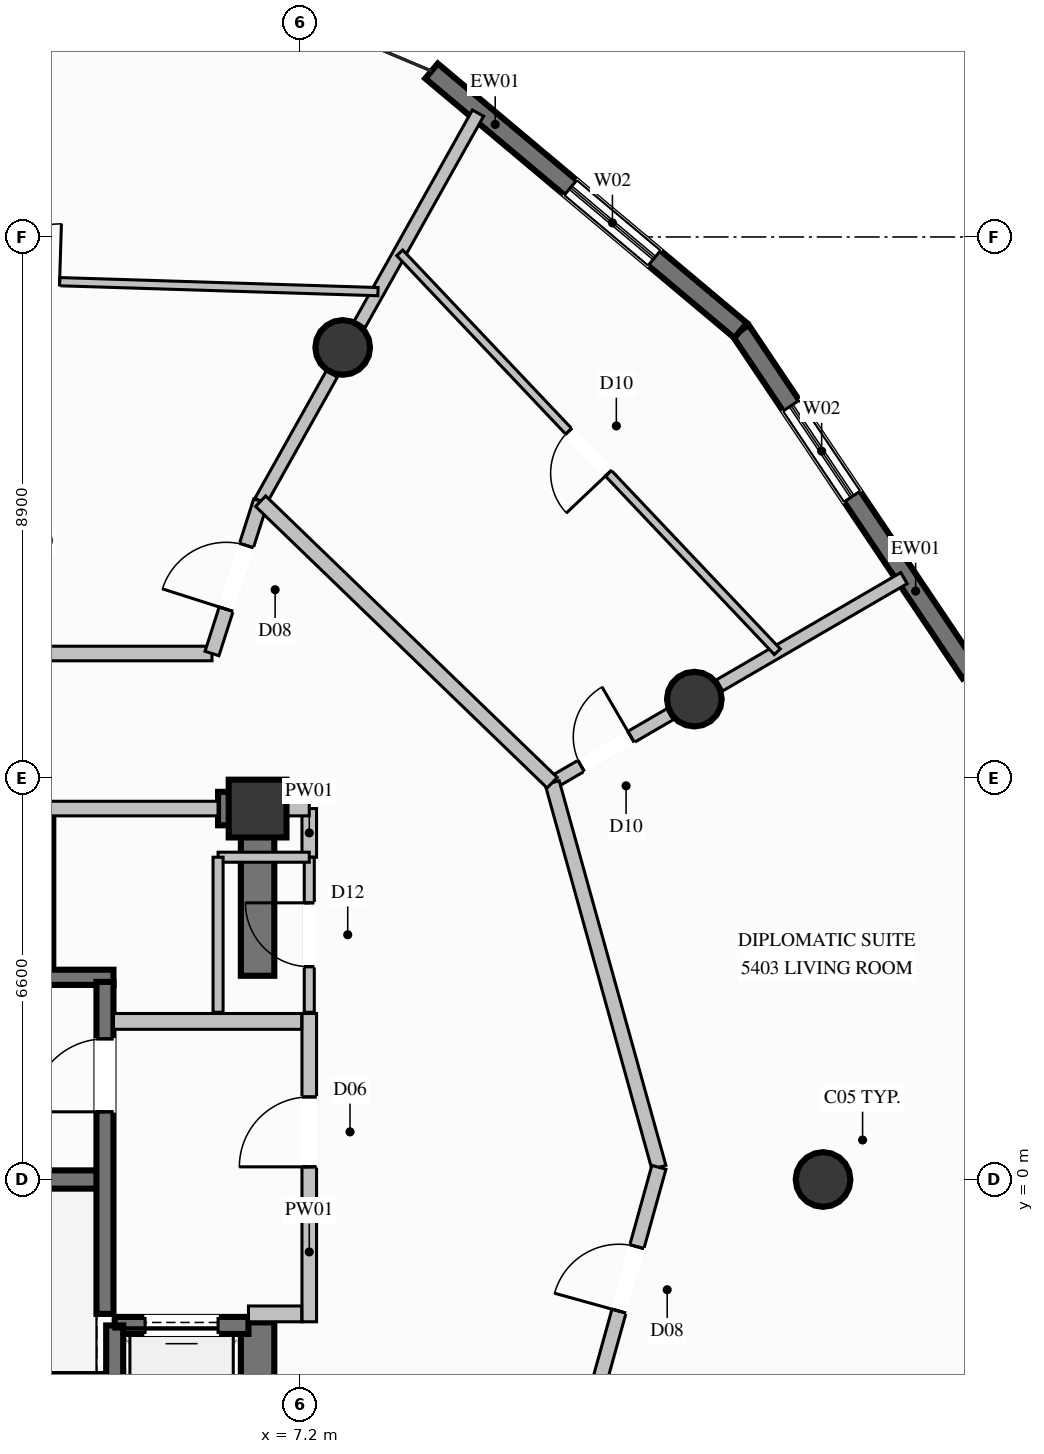
"""IFC4 building model, lengths in metres.
Left out: names, types, materials, properties, quantities, classifications, styles, units other than length and angle.
Written with IfcOpenShell. Run it as: python <this file> out.ifc"""

import sys

from ifc_helpers import new_model, si_unit, direction, frame, frame_2d, origin, origin_2d, place, context, subcontext, project, spatial, rectangle, circle, extrude, element, fill, save


model = new_model("IFC4")
c1 = context("Model", 3, precision=1e-05, world=origin(), true_north=direction((0.0, 1.0)))
c2 = subcontext(c1, "Body", "Model", "MODEL_VIEW")
j1 = project(units=[si_unit("LENGTHUNIT", "METRE"), si_unit("PLANEANGLEUNIT", "RADIAN")], contexts=[c1])
p1 = place(None, origin())
s1 = spatial("IfcSite", under=j1, at=p1, CompositionType="ELEMENT")
p2 = place(p1, origin())
s2 = spatial("IfcBuilding", under=s1, at=p2, CompositionType="ELEMENT")
p3 = place(p2, frame((0.0, 0.0, 202.0)))
s3 = spatial("IfcBuildingStorey", under=s2, at=p3, CompositionType="ELEMENT", Elevation=202.0)
p4 = place(p3, frame((6.5, 6.1, 0.0), z_axis=(0.0, 0.0, 1.0), x_axis=(1.0, 0.0, 0.0)))
e1 = element("IfcColumn", 1, at=p4, inside=s3, PredefinedType="COLUMN", context=c2, shape_type="SweptSolid", body=[
    extrude(rectangle(XDim=0.95, YDim=0.95, at=origin_2d()), origin(), (0.0, 0.0, 1.0), 3.6),
])
p5 = place(p3, frame((-3.99, 0.0, 0.0), z_axis=(0.0, 0.0, 1.0), x_axis=(1.0, 0.0, 0.0)))
e2 = element("IfcWall", 2, at=p5, inside=s3, PredefinedType="SHEAR", context=c2, shape_type="SweptSolid", body=[
    extrude(rectangle(XDim=7.98, YDim=0.3, at=frame_2d((3.99, 0.0))), origin(), (0.0, 0.0, 1.0), 3.6),
])
for number, where, z_axis, x_axis in (
    (3, (-4.13, -3.325, 0.0), (0.0, 0.0, 1.0), (1.0, 0.0, 0.0)),
    (4, (-4.13, 3.325, 0.0), (0.0, 0.0, 1.0), (1.0, 0.0, 0.0)),
):
    element("IfcWall", number, at=place(p3, frame(where, z_axis=z_axis, x_axis=x_axis)), inside=s3, PredefinedType="SOLIDWALL", context=c2, shape_type="SweptSolid", body=[
        extrude(rectangle(XDim=8.26, YDim=0.25, at=frame_2d((4.13, 0.0))), origin(), (0.0, 0.0, 1.0), 3.6),
    ])
p6 = place(p3, frame((5.85, 6.1, 0.0), z_axis=(0.0, 0.0, 1.0), x_axis=(1.0, 0.0, 0.0)))
e5 = element("IfcWall", 5, at=p6, inside=s3, PredefinedType="SHEAR", context=c2, shape_type="SweptSolid", body=[
    extrude(rectangle(XDim=0.375, YDim=0.55, at=frame_2d((0.188, 0.0))), origin(), (0.0, 0.0, 1.0), 3.6),
])
p7 = place(p3, frame((6.5, -6.375, 0.0), z_axis=(0.0, 0.0, 1.0), x_axis=(0.0, 1.0, 0.0)))
e6 = element("IfcWall", 6, at=p7, inside=s3, PredefinedType="SHEAR", context=c2, shape_type="SweptSolid", body=[
    extrude(rectangle(XDim=4.025, YDim=0.55, at=frame_2d((2.012, 0.0))), origin(), (0.0, 0.0, 1.0), 3.6),
])
p8 = place(p3, frame((6.5, 3.35, 0.0), z_axis=(0.0, 0.0, 1.0), x_axis=(0.0, 1.0, 0.0)))
e7 = element("IfcWall", 7, at=p8, inside=s3, PredefinedType="SHEAR", context=c2, shape_type="SweptSolid", body=[
    extrude(rectangle(XDim=3.025, YDim=0.55, at=frame_2d((1.512, 0.0))), origin(), (0.0, 0.0, 1.0), 3.6),
])
for number, where, z_axis, x_axis in (
    (8, (15.8, 0.0, 0.0), (0.0, 0.0, 1.0), (1.0, 0.0, 0.0)),
    (9, (13.683, 7.9, 0.0), (0.0, 0.0, 1.0), (1.0, 0.0, 0.0)),
    (10, (7.9, 13.683, 0.0), (0.0, 0.0, 1.0), (1.0, 0.0, 0.0)),
):
    element("IfcColumn", number, at=place(p3, frame(where, z_axis=z_axis, x_axis=x_axis)), inside=s3, PredefinedType="COLUMN", context=c2, shape_type="SweptSolid", body=[
        extrude(circle(Radius=0.45, at=origin_2d()), origin(), (0.0, 0.0, 1.0), 3.6),
    ])
p9 = place(p3, frame((14.445, 13.962, 0.0), z_axis=(0.0, 0.0, 1.0), x_axis=(0.557429227347, -0.830224461516, 0.0)))
e11 = element("IfcWall", 11, at=p9, inside=s3, PredefinedType="SOLIDWALL", context=c2, shape_type="SweptSolid", body=[
    extrude(rectangle(XDim=6.785, YDim=0.32, at=frame_2d((3.392, 0.0))), origin(), (0.0, 0.0, 1.0), 3.36),
])
p10 = place(p9, frame((1.489, 0.0, 0.35)))
e12 = element("IfcOpeningElement", 12, at=p10, cuts=e11, PredefinedType="OPENING", context=c2, shape_type="SweptSolid", body=[
    extrude(rectangle(XDim=1.8, YDim=2.6, at=frame_2d((0.9, 1.3))), frame((0.0, 0.17, 0.0), z_axis=(0.0, -1.0, 0.0), x_axis=(1.0, 0.0, 0.0)), (0.0, 0.0, 1.0), 0.34),
])
p11 = place(p3, frame((9.361, 18.229, 0.0), z_axis=(0.0, 0.0, 1.0), x_axis=(0.765961316102, -0.642886663601, 0.0)))
e13 = element("IfcWall", 13, at=p11, inside=s3, PredefinedType="SOLIDWALL", context=c2, shape_type="SweptSolid", body=[
    extrude(rectangle(XDim=6.637, YDim=0.32, at=frame_2d((3.319, 0.0))), origin(), (0.0, 0.0, 1.0), 3.36),
])
p12 = place(p11, frame((2.984, 0.0, 0.35)))
e14 = element("IfcOpeningElement", 14, at=p12, cuts=e13, PredefinedType="OPENING", context=c2, shape_type="SweptSolid", body=[
    extrude(rectangle(XDim=1.8, YDim=2.6, at=frame_2d((0.9, 1.3))), frame((0.0, 0.17, 0.0), z_axis=(0.0, -1.0, 0.0), x_axis=(1.0, 0.0, 0.0)), (0.0, 0.0, 1.0), 0.34),
])
p13 = place(p3, frame((3.0, 3.5, 0.0), z_axis=(0.0, 0.0, 1.0), x_axis=(0.0, 1.0, 0.0)))
e15 = element("IfcWall", 15, at=p13, inside=s3, PredefinedType="SOLIDWALL", context=c2, shape_type="SweptSolid", body=[
    extrude(rectangle(XDim=2.5, YDim=0.28, at=frame_2d((1.25, 0.0))), origin(), (0.0, 0.0, 1.0), 3.36),
])
p14 = place(p3, frame((6.35, -2.4, 0.0), z_axis=(0.0, 0.0, 1.0), x_axis=(-1.0, 0.0, 0.0)))
e16 = element("IfcWall", 16, at=p14, inside=s3, PredefinedType="SOLIDWALL", context=c2, shape_type="SweptSolid", body=[
    extrude(rectangle(XDim=2.2, YDim=0.28, at=frame_2d((1.1, 0.0))), origin(), (0.0, 0.0, 1.0), 3.36),
])
p15 = place(p14, frame((0.5, 0.0, 0.0)))
e17 = element("IfcOpeningElement", 17, at=p15, cuts=e16, PredefinedType="OPENING", context=c2, shape_type="SweptSolid", body=[
    extrude(rectangle(XDim=1.2, YDim=2.2, at=frame_2d((0.6, 1.1))), frame((0.0, 0.15, 0.0), z_axis=(0.0, -1.0, 0.0), x_axis=(1.0, 0.0, 0.0)), (0.0, 0.0, 1.0), 0.3),
])
p16 = place(p3, frame((4.15, -2.4, 0.0), z_axis=(0.0, 0.0, 1.0), x_axis=(0.0, -1.0, 0.0)))
e18 = element("IfcWall", 18, at=p16, inside=s3, PredefinedType="SOLIDWALL", context=c2, shape_type="SweptSolid", body=[
    extrude(rectangle(XDim=2.7, YDim=0.28, at=frame_2d((1.35, 0.0))), origin(), (0.0, 0.0, 1.0), 3.36),
])
p17 = place(p3, frame((3.99, -2.21, 0.0), z_axis=(0.0, 0.0, 1.0), x_axis=(0.0, 1.0, 0.0)))
e19 = element("IfcWall", 19, at=p17, inside=s3, PredefinedType="SOLIDWALL", context=c2, shape_type="SweptSolid", body=[
    extrude(rectangle(XDim=5.46, YDim=0.28, at=frame_2d((2.73, 0.0))), origin(), (0.0, 0.0, 1.0), 3.36),
])
p18 = place(p17, frame((3.323, 0.0, 0.0)))
e20 = element("IfcOpeningElement", 20, at=p18, cuts=e19, PredefinedType="OPENING", context=c2, shape_type="SweptSolid", body=[
    extrude(rectangle(XDim=1.2, YDim=2.2, at=frame_2d((0.6, 1.1))), frame((0.0, 0.15, 0.0), z_axis=(0.0, -1.0, 0.0), x_axis=(1.0, 0.0, 0.0)), (0.0, 0.0, 1.0), 0.3),
])
p19 = place(p3, frame((7.35, -2.34, 0.0), z_axis=(0.0, 0.0, 1.0), x_axis=(0.0, 1.0, 0.0)))
e21 = element("IfcWall", 21, at=p19, inside=s3, PredefinedType="PARTITIONING", context=c2, shape_type="SweptSolid", body=[
    extrude(rectangle(XDim=5.07, YDim=0.24, at=frame_2d((2.535, 0.0))), origin(), (0.0, 0.0, 1.0), 2.445),
])
p20 = place(p19, frame((2.548, 0.0, 0.0)))
e22 = element("IfcOpeningElement", 22, at=p20, cuts=e21, PredefinedType="OPENING", context=c2, shape_type="SweptSolid", body=[
    extrude(rectangle(XDim=1.15, YDim=2.2, at=frame_2d((0.575, 1.1))), frame((0.0, 0.13, 0.0), z_axis=(0.0, -1.0, 0.0), x_axis=(1.0, 0.0, 0.0)), (0.0, 0.0, 1.0), 0.26),
])
p21 = place(p3, frame((6.35, -2.21, 0.0), z_axis=(0.0, 0.0, 1.0), x_axis=(1.0, 0.0, 0.0)))
e23 = element("IfcWall", 23, at=p21, inside=s3, PredefinedType="PARTITIONING", context=c2, shape_type="SweptSolid", body=[
    extrude(rectangle(XDim=0.875, YDim=0.26, at=frame_2d((0.438, 0.0))), origin(), (0.0, 0.0, 1.0), 3.36),
])
p22 = place(p3, frame((4.13, 2.6, 0.0), z_axis=(0.0, 0.0, 1.0), x_axis=(1.0, 0.0, 0.0)))
e24 = element("IfcWall", 24, at=p22, inside=s3, PredefinedType="PARTITIONING", context=c2, shape_type="SweptSolid", body=[
    extrude(rectangle(XDim=3.095, YDim=0.26, at=frame_2d((1.548, 0.0))), origin(), (0.0, 0.0, 1.0), 3.36),
])
p23 = place(p3, frame((-7.35, 8.65, 0.0), z_axis=(0.0, 0.0, 1.0), x_axis=(1.0, 0.0, 0.0)))
e25 = element("IfcWall", 25, at=p23, inside=s3, PredefinedType="PARTITIONING", context=c2, shape_type="SweptSolid", body=[
    extrude(rectangle(XDim=13.1, YDim=0.24, at=frame_2d((6.55, 0.0))), origin(), (0.0, 0.0, 1.0), 3.36),
])
p24 = place(p3, frame((3.0, 6.1, 0.0), z_axis=(0.0, 0.0, 1.0), x_axis=(1.0, 0.0, 0.0)))
e26 = element("IfcWall", 26, at=p24, inside=s3, PredefinedType="PARTITIONING", context=c2, shape_type="SweptSolid", body=[
    extrude(rectangle(XDim=2.85, YDim=0.24, at=frame_2d((1.425, 0.0))), origin(), (0.0, 0.0, 1.0), 2.445),
])
p25 = place(p3, frame((7.35, 5.3, 0.0), z_axis=(0.0, 0.0, 1.0), x_axis=(0.0, 1.0, 0.0)))
e27 = element("IfcWall", 27, at=p25, inside=s3, PredefinedType="PARTITIONING", context=c2, shape_type="SweptSolid", body=[
    extrude(rectangle(XDim=0.8, YDim=0.24, at=frame_2d((0.4, 0.0))), origin(), (0.0, 0.0, 1.0), 2.445),
])
p26 = place(p3, frame((6.5, 6.1, 0.0), z_axis=(0.0, 0.0, 1.0), x_axis=(1.0, 0.0, 0.0)))
e28 = element("IfcWall", 28, at=p26, inside=s3, PredefinedType="PARTITIONING", context=c2, shape_type="SweptSolid", body=[
    extrude(rectangle(XDim=0.85, YDim=0.24, at=frame_2d((0.425, 0.0))), origin(), (0.0, 0.0, 1.0), 2.801),
])
p27 = place(p3, frame((7.35, 2.75, 0.0), z_axis=(0.0, 0.0, 1.0), x_axis=(0.0, 1.0, 0.0)))
e29 = element("IfcWall", 29, at=p27, inside=s3, PredefinedType="PARTITIONING", context=c2, shape_type="SweptSolid", body=[
    extrude(rectangle(XDim=2.55, YDim=0.165, at=frame_2d((1.275, 0.0))), origin(), (0.0, 0.0, 1.0), 3.36),
])
p28 = place(p27, frame((0.75, 0.0, 0.0)))
e30 = element("IfcOpeningElement", 30, at=p28, cuts=e29, PredefinedType="OPENING", context=c2, shape_type="SweptSolid", body=[
    extrude(rectangle(XDim=1.05, YDim=2.15, at=frame_2d((0.525, 1.075))), frame((0.0, 0.093, 0.0), z_axis=(0.0, -1.0, 0.0), x_axis=(1.0, 0.0, 0.0)), (0.0, 0.0, 1.0), 0.185),
])
p29 = place(p3, frame((7.35, 5.3, 0.0), z_axis=(0.0, 0.0, 1.0), x_axis=(-1.0, 0.0, 0.0)))
e31 = element("IfcWall", 31, at=p29, inside=s3, PredefinedType="PARTITIONING", context=c2, shape_type="SweptSolid", body=[
    extrude(rectangle(XDim=1.5, YDim=0.165, at=frame_2d((0.75, 0.0))), origin(), (0.0, 0.0, 1.0), 2.445),
])
p30 = place(p3, frame((5.85, 5.3, 0.0), z_axis=(0.0, 0.0, 1.0), x_axis=(0.0, -1.0, 0.0)))
e32 = element("IfcWall", 32, at=p30, inside=s3, PredefinedType="PARTITIONING", context=c2, shape_type="SweptSolid", body=[
    extrude(rectangle(XDim=2.55, YDim=0.165, at=frame_2d((1.275, 0.0))), origin(), (0.0, 0.0, 1.0), 2.445),
])
p31 = place(p3, frame((11.345, 6.525, 0.0), z_axis=(0.0, 0.0, 1.0), x_axis=(0.864528085785, 0.502584509201, 0.0)))
e33 = element("IfcWall", 33, at=p31, inside=s3, PredefinedType="PARTITIONING", context=c2, shape_type="SweptSolid", body=[
    extrude(rectangle(XDim=2.243, YDim=0.21, at=frame_2d((1.122, 0.0))), origin(), (0.0, 0.0, 1.0), 2.801),
])
p32 = place(p31, frame((0.55, 0.0, 0.0)))
e34 = element("IfcOpeningElement", 34, at=p32, cuts=e33, PredefinedType="OPENING", context=c2, shape_type="SweptSolid", body=[
    extrude(rectangle(XDim=0.95, YDim=2.1, at=frame_2d((0.475, 1.05))), frame((0.0, 0.115, 0.0), z_axis=(0.0, -1.0, 0.0), x_axis=(1.0, 0.0, 0.0)), (0.0, 0.0, 1.0), 0.23),
])
p33 = place(p3, frame((14.096, 8.125, 0.0), z_axis=(0.0, 0.0, 1.0), x_axis=(0.864474159334, 0.502677260121, 0.0)))
e35 = element("IfcWall", 35, at=p33, inside=s3, PredefinedType="PARTITIONING", context=c2, shape_type="SweptSolid", body=[
    extrude(rectangle(XDim=3.511, YDim=0.21, at=frame_2d((1.755, 0.0))), origin(), (0.0, 0.0, 1.0), 3.36),
])
p34 = place(p3, frame((6.55, 11.155, 0.0), z_axis=(0.0, 0.0, 1.0), x_axis=(0.488535184748, 0.872544195593, 0.0)))
e36 = element("IfcWall", 36, at=p34, inside=s3, PredefinedType="PARTITIONING", context=c2, shape_type="SweptSolid", body=[
    extrude(rectangle(XDim=2.399, YDim=0.21, at=frame_2d((1.199, 0.0))), origin(), (0.0, 0.0, 1.0), 2.801),
])
p35 = place(p3, frame((8.178, 14.062, 0.0), z_axis=(0.0, 0.0, 1.0), x_axis=(0.488788123952, 0.87240252744, 0.0)))
e37 = element("IfcWall", 37, at=p35, inside=s3, PredefinedType="PARTITIONING", context=c2, shape_type="SweptSolid", body=[
    extrude(rectangle(XDim=3.983, YDim=0.21, at=frame_2d((1.992, 0.0))), origin(), (0.0, 0.0, 1.0), 3.36),
])
p36 = place(p3, frame((5.75, 8.65, 0.0), z_axis=(0.0, 0.0, 1.0), x_axis=(0.304226604656, 0.952599691906, 0.0)))
e38 = element("IfcWall", 38, at=p36, inside=s3, PredefinedType="PARTITIONING", context=c2, shape_type="SweptSolid", body=[
    extrude(rectangle(XDim=2.63, YDim=0.24, at=frame_2d((1.315, 0.0))), origin(), (0.0, 0.0, 1.0), 3.36),
])
p37 = place(p36, frame((0.765, 0.0, 0.0)))
e39 = element("IfcOpeningElement", 39, at=p37, cuts=e38, PredefinedType="OPENING", context=c2, shape_type="SweptSolid", body=[
    extrude(rectangle(XDim=1.1, YDim=2.3, at=frame_2d((0.55, 1.15))), frame((0.0, 0.13, 0.0), z_axis=(0.0, -1.0, 0.0), x_axis=(1.0, 0.0, 0.0)), (0.0, 0.0, 1.0), 0.26),
])
p38 = place(p3, frame((-2.942, 14.959, 0.0), z_axis=(0.0, 0.0, 1.0), x_axis=(0.999509404504, -0.031320126261, 0.0)))
e40 = element("IfcWall", 40, at=p38, inside=s3, PredefinedType="PARTITIONING", context=c2, shape_type="SweptSolid", body=[
    extrude(rectangle(XDim=11.427, YDim=0.135, at=frame_2d((5.714, 0.0))), origin(), (0.0, 0.0, 1.0), 2.929),
])
p39 = place(p38, frame((5.239, 0.0, 0.0)))
e41 = element("IfcOpeningElement", 41, at=p39, cuts=e40, PredefinedType="OPENING", context=c2, shape_type="SweptSolid", body=[
    extrude(rectangle(XDim=0.95, YDim=2.1, at=frame_2d((0.475, 1.05))), frame((0.0, 0.078, 0.0), z_axis=(0.0, -1.0, 0.0), x_axis=(1.0, 0.0, 0.0)), (0.0, 0.0, 1.0), 0.155),
])
p40 = place(p3, frame((13.1, 0.2, 0.0), z_axis=(0.0, 0.0, 1.0), x_axis=(-0.26738871748, 0.963588747218, 0.0)))
e42 = element("IfcWall", 42, at=p40, inside=s3, PredefinedType="PARTITIONING", context=c2, shape_type="SweptSolid", body=[
    extrude(rectangle(XDim=6.564, YDim=0.24, at=frame_2d((3.282, 0.0))), origin(), (0.0, 0.0, 1.0), 3.36),
])
p41 = place(p3, frame((12.082, -3.469, 0.0), z_axis=(0.0, 0.0, 1.0), x_axis=(0.267379290897, 0.963591362975, 0.0)))
e43 = element("IfcWall", 43, at=p41, inside=s3, PredefinedType="PARTITIONING", context=c2, shape_type="SweptSolid", body=[
    extrude(rectangle(XDim=3.808, YDim=0.24, at=frame_2d((1.904, 0.0))), origin(), (0.0, 0.0, 1.0), 3.36),
])
p42 = place(p41, frame((1.354, 0.0, 0.0)))
e44 = element("IfcOpeningElement", 44, at=p42, cuts=e43, PredefinedType="OPENING", context=c2, shape_type="SweptSolid", body=[
    extrude(rectangle(XDim=1.1, YDim=2.3, at=frame_2d((0.55, 1.15))), frame((0.0, 0.13, 0.0), z_axis=(0.0, -1.0, 0.0), x_axis=(1.0, 0.0, 0.0)), (0.0, 0.0, 1.0), 0.26),
])
p43 = place(p3, frame((11.345, 6.525, 0.0), z_axis=(0.0, 0.0, 1.0), x_axis=(-0.719360436772, 0.694637000172, 0.0)))
e45 = element("IfcWall", 45, at=p43, inside=s3, PredefinedType="PARTITIONING", context=c2, shape_type="SweptSolid", body=[
    extrude(rectangle(XDim=6.666, YDim=0.24, at=frame_2d((3.333, 0.0))), origin(), (0.0, 0.0, 1.0), 3.36),
])
p44 = place(p3, frame((15.048, 8.679, 0.0), z_axis=(0.0, 0.0, 1.0), x_axis=(-0.687476978128, 0.726206172202, 0.0)))
e46 = element("IfcWall", 46, at=p44, inside=s3, PredefinedType="PARTITIONING", context=c2, shape_type="SweptSolid", body=[
    extrude(rectangle(XDim=9.033, YDim=0.135, at=frame_2d((4.517, 0.0))), origin(), (0.0, 0.0, 1.0), 3.36),
])
p45 = place(p44, frame((4.042, 0.0, 0.0)))
e47 = element("IfcOpeningElement", 47, at=p45, cuts=e46, PredefinedType="OPENING", context=c2, shape_type="SweptSolid", body=[
    extrude(rectangle(XDim=0.95, YDim=2.1, at=frame_2d((0.475, 1.05))), frame((0.0, 0.078, 0.0), z_axis=(0.0, -1.0, 0.0), x_axis=(1.0, 0.0, 0.0)), (0.0, 0.0, 1.0), 0.155),
])
p46 = place(p10, origin())
e48 = element("IfcWindow", 48, at=p46, inside=s3, PartitioningType="SINGLE_PANEL", PredefinedType="WINDOW", context=c2, shape_type="SweptSolid", body=[
    extrude(rectangle(XDim=1.8, YDim=2.6, at=frame_2d((0.9, 1.3))), frame((0.0, 0.03, 0.0), z_axis=(0.0, -1.0, 0.0), x_axis=(1.0, 0.0, 0.0)), (0.0, 0.0, 1.0), 0.06),
])
fill(e12, e48)
p47 = place(p12, origin())
e49 = element("IfcWindow", 49, at=p47, inside=s3, PartitioningType="SINGLE_PANEL", PredefinedType="WINDOW", context=c2, shape_type="SweptSolid", body=[
    extrude(rectangle(XDim=1.8, YDim=2.6, at=frame_2d((0.9, 1.3))), frame((0.0, 0.03, 0.0), z_axis=(0.0, -1.0, 0.0), x_axis=(1.0, 0.0, 0.0)), (0.0, 0.0, 1.0), 0.06),
])
fill(e14, e49)
p48 = place(p15, origin())
e50 = element("IfcDoor", 50, at=p48, inside=s3, OperationType="SLIDING_TO_LEFT", PredefinedType="DOOR", context=c2, shape_type="SweptSolid", body=[
    extrude(rectangle(XDim=1.2, YDim=2.2, at=frame_2d((0.6, 1.1))), frame((0.0, 0.025, 0.0), z_axis=(0.0, -1.0, 0.0), x_axis=(1.0, 0.0, 0.0)), (0.0, 0.0, 1.0), 0.05),
])
fill(e17, e50)
p49 = place(p18, origin())
e51 = element("IfcDoor", 51, at=p49, inside=s3, OperationType="SINGLE_SWING_LEFT", PredefinedType="DOOR", context=c2, shape_type="SweptSolid", body=[
    extrude(rectangle(XDim=1.2, YDim=2.2, at=frame_2d((0.6, 1.1))), frame((0.0, 0.025, 0.0), z_axis=(0.0, -1.0, 0.0), x_axis=(1.0, 0.0, 0.0)), (0.0, 0.0, 1.0), 0.05),
])
fill(e20, e51)
p50 = place(p20, origin())
e52 = element("IfcDoor", 52, at=p50, inside=s3, OperationType="SINGLE_SWING_LEFT", PredefinedType="DOOR", context=c2, shape_type="SweptSolid", body=[
    extrude(rectangle(XDim=1.15, YDim=2.2, at=frame_2d((0.575, 1.1))), frame((0.0, 0.025, 0.0), z_axis=(0.0, -1.0, 0.0), x_axis=(1.0, 0.0, 0.0)), (0.0, 0.0, 1.0), 0.05),
])
fill(e22, e52)
p51 = place(p28, origin())
e53 = element("IfcDoor", 53, at=p51, inside=s3, OperationType="SINGLE_SWING_RIGHT", PredefinedType="DOOR", context=c2, shape_type="SweptSolid", body=[
    extrude(rectangle(XDim=1.05, YDim=2.15, at=frame_2d((0.525, 1.075))), frame((0.0, 0.025, 0.0), z_axis=(0.0, -1.0, 0.0), x_axis=(1.0, 0.0, 0.0)), (0.0, 0.0, 1.0), 0.05),
])
fill(e30, e53)
p52 = place(p37, origin())
e54 = element("IfcDoor", 54, at=p52, inside=s3, OperationType="SINGLE_SWING_LEFT", PredefinedType="DOOR", context=c2, shape_type="SweptSolid", body=[
    extrude(rectangle(XDim=1.1, YDim=2.3, at=frame_2d((0.55, 1.15))), frame((0.0, 0.025, 0.0), z_axis=(0.0, -1.0, 0.0), x_axis=(1.0, 0.0, 0.0)), (0.0, 0.0, 1.0), 0.05),
])
fill(e39, e54)
p53 = place(p39, origin())
e55 = element("IfcDoor", 55, at=p53, inside=s3, OperationType="SINGLE_SWING_RIGHT", PredefinedType="DOOR", context=c2, shape_type="SweptSolid", body=[
    extrude(rectangle(XDim=0.95, YDim=2.1, at=frame_2d((0.475, 1.05))), frame((0.0, 0.025, 0.0), z_axis=(0.0, -1.0, 0.0), x_axis=(1.0, 0.0, 0.0)), (0.0, 0.0, 1.0), 0.05),
])
fill(e41, e55)
p54 = place(p42, origin())
e56 = element("IfcDoor", 56, at=p54, inside=s3, OperationType="SINGLE_SWING_LEFT", PredefinedType="DOOR", context=c2, shape_type="SweptSolid", body=[
    extrude(rectangle(XDim=1.1, YDim=2.3, at=frame_2d((0.55, 1.15))), frame((0.0, 0.025, 0.0), z_axis=(0.0, -1.0, 0.0), x_axis=(1.0, 0.0, 0.0)), (0.0, 0.0, 1.0), 0.05),
])
fill(e44, e56)
p55 = place(p32, origin())
e57 = element("IfcDoor", 57, at=p55, inside=s3, OperationType="SINGLE_SWING_RIGHT", PredefinedType="DOOR", context=c2, shape_type="SweptSolid", body=[
    extrude(rectangle(XDim=0.95, YDim=2.1, at=frame_2d((0.475, 1.05))), frame((0.0, 0.025, 0.0), z_axis=(0.0, -1.0, 0.0), x_axis=(1.0, 0.0, 0.0)), (0.0, 0.0, 1.0), 0.05),
])
fill(e34, e57)
p56 = place(p45, origin())
e58 = element("IfcDoor", 58, at=p56, inside=s3, OperationType="SINGLE_SWING_LEFT", PredefinedType="DOOR", context=c2, shape_type="SweptSolid", body=[
    extrude(rectangle(XDim=0.95, YDim=2.1, at=frame_2d((0.475, 1.05))), frame((0.0, 0.025, 0.0), z_axis=(0.0, -1.0, 0.0), x_axis=(1.0, 0.0, 0.0)), (0.0, 0.0, 1.0), 0.05),
])
fill(e47, e58)
save(model, sys.argv[1])
